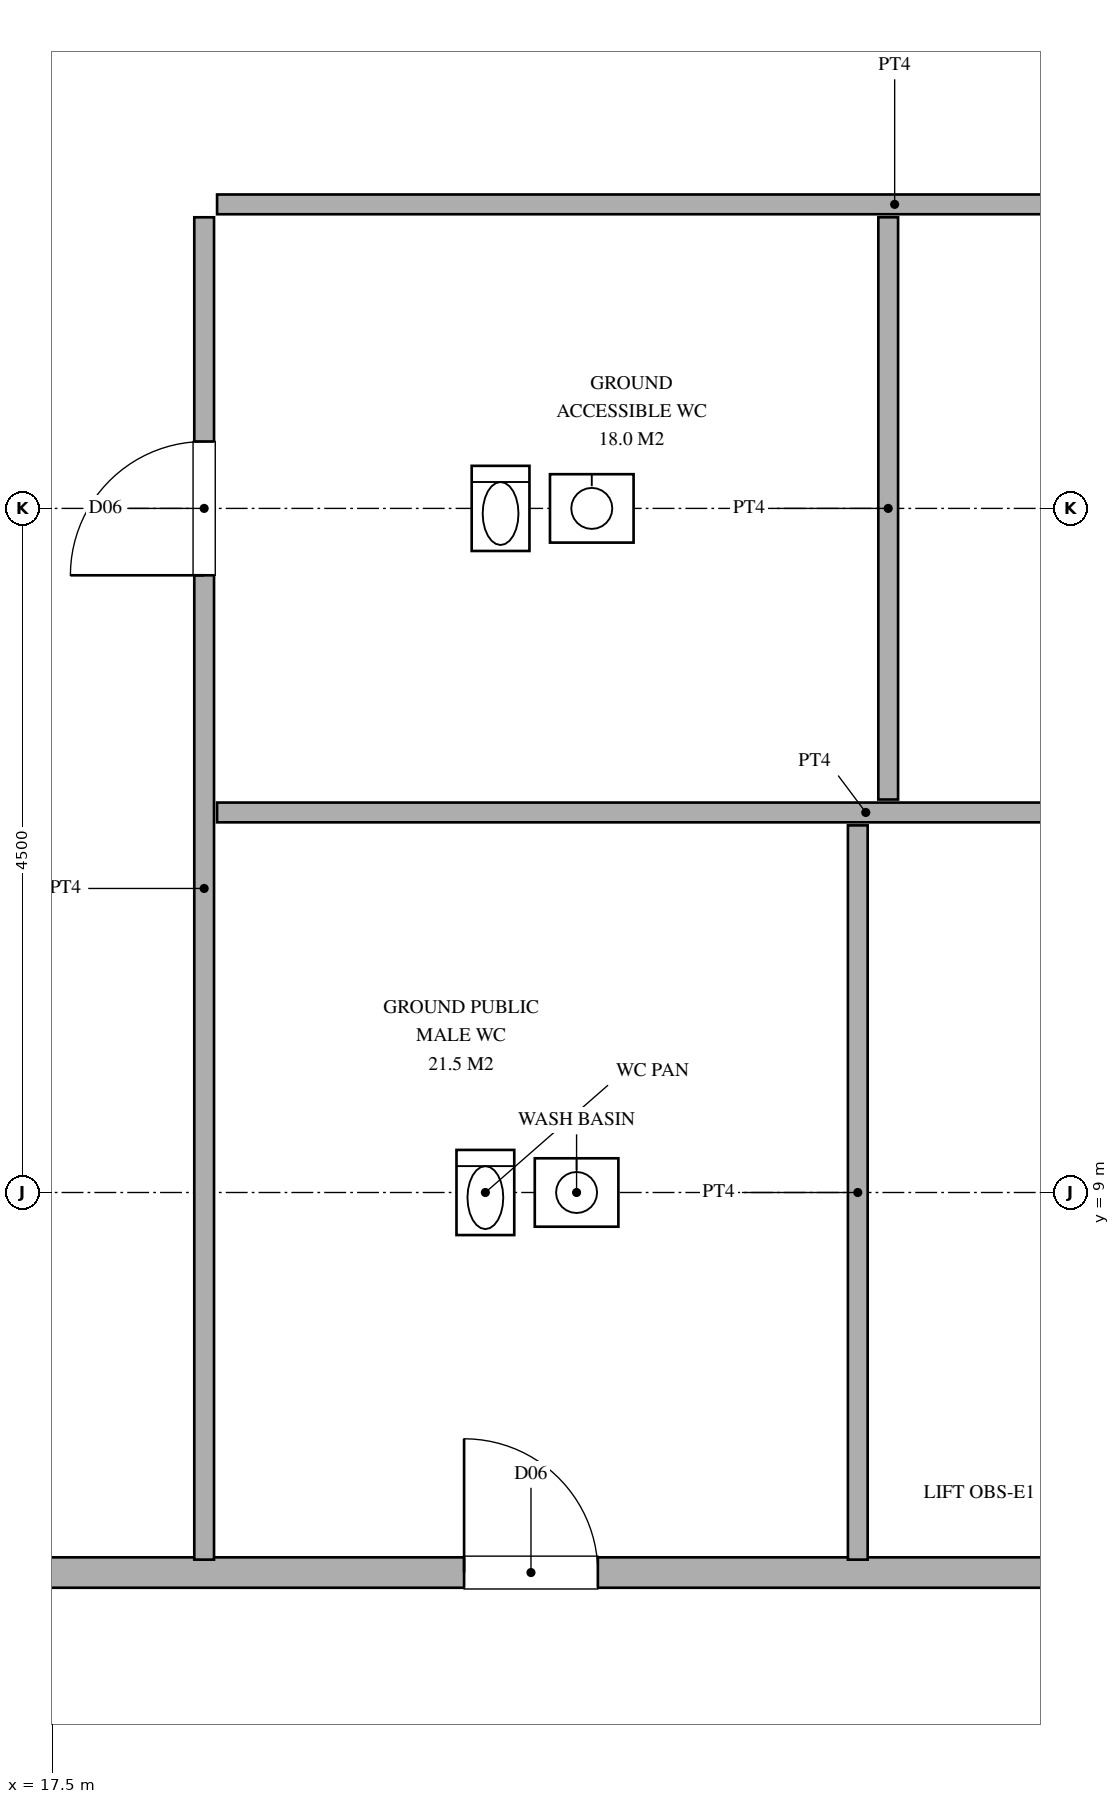
"""IFC4 building model, lengths in metres.
Left out: names, types, materials, properties, quantities, classifications, styles, units other than length and angle.
Written with IfcOpenShell. Run it as: python <this file> out.ifc"""

import sys

from ifc_helpers import new_model, si_unit, direction, frame, frame_2d, origin, place, context, subcontext, project, spatial, rectangle, extrude, source, transform, mapped, element, fill, save


model = new_model("IFC4")
c1 = context("Model", 3, precision=1e-05, world=origin(), true_north=direction((0.0, 1.0)))
c2 = subcontext(c1, "Body", "Model", "MODEL_VIEW")
j1 = project(units=[si_unit("LENGTHUNIT", "METRE"), si_unit("PLANEANGLEUNIT", "RADIAN")], contexts=[c1])
p1 = place(None, origin())
s1 = spatial("IfcSite", under=j1, at=p1, CompositionType="ELEMENT")
p2 = place(p1, origin())
s2 = spatial("IfcBuilding", under=s1, at=p2, CompositionType="ELEMENT")
p3 = place(p2, origin())
s3 = spatial("IfcBuildingStorey", under=s2, at=p3, CompositionType="ELEMENT", Elevation=0.0)
p4 = place(p3, frame((-27.12, 6.5, 0.0), z_axis=(0.0, 0.0, 1.0), x_axis=(1.0, 0.0, 0.0)))
e1 = element("IfcWall", 1, at=p4, inside=s3, PredefinedType="PARTITIONING", context=c2, shape_type="SweptSolid", body=[
    extrude(rectangle(XDim=54.24, YDim=0.2, at=frame_2d((27.12, 0.0))), origin(), (0.0, 0.0, 1.0), 5.12),
])
p5 = place(p4, frame((4.045, 0.0, 0.0)))
e2 = element("IfcOpeningElement", 2, at=p5, cuts=e1, PredefinedType="OPENING", context=c2, shape_type="SweptSolid", body=[
    extrude(rectangle(XDim=1.15, YDim=2.2, at=frame_2d((0.575, 1.1))), frame((0.0, 0.11, 0.0), z_axis=(0.0, -1.0, 0.0), x_axis=(1.0, 0.0, 0.0)), (0.0, 0.0, 1.0), 0.22),
])
p6 = place(p4, frame((17.395, 0.0, 0.0)))
e3 = element("IfcOpeningElement", 3, at=p6, cuts=e1, PredefinedType="OPENING", context=c2, shape_type="SweptSolid", body=[
    extrude(rectangle(XDim=0.95, YDim=2.15, at=frame_2d((0.475, 1.075))), frame((0.0, 0.11, 0.0), z_axis=(0.0, -1.0, 0.0), x_axis=(1.0, 0.0, 0.0)), (0.0, 0.0, 1.0), 0.22),
])
p7 = place(p4, frame((47.33, 0.0, 0.0)))
e4 = element("IfcOpeningElement", 4, at=p7, cuts=e1, PredefinedType="OPENING", context=c2, shape_type="SweptSolid", body=[
    extrude(rectangle(XDim=0.88, YDim=2.1, at=frame_2d((0.44, 1.05))), frame((0.0, 0.11, 0.0), z_axis=(0.0, -1.0, 0.0), x_axis=(1.0, 0.0, 0.0)), (0.0, 0.0, 1.0), 0.22),
])
p8 = place(p4, frame((51.68, 0.0, 0.0)))
e5 = element("IfcOpeningElement", 5, at=p8, cuts=e1, PredefinedType="OPENING", context=c2, shape_type="SweptSolid", body=[
    extrude(rectangle(XDim=0.88, YDim=2.1, at=frame_2d((0.44, 1.05))), frame((0.0, 0.11, 0.0), z_axis=(0.0, -1.0, 0.0), x_axis=(1.0, 0.0, 0.0)), (0.0, 0.0, 1.0), 0.22),
])
p9 = place(p3, frame((18.585, 11.5, 0.0), z_axis=(0.0, 0.0, 1.0), x_axis=(1.0, 0.0, 0.0)))
e6 = element("IfcWall", 6, at=p9, inside=s3, PredefinedType="PARTITIONING", context=c2, shape_type="SweptSolid", body=[
    extrude(rectangle(XDim=8.535, YDim=0.13, at=frame_2d((4.268, 0.0))), origin(), (0.0, 0.0, 1.0), 5.12),
])
p10 = place(p3, frame((18.585, 15.5, 0.0), z_axis=(0.0, 0.0, 1.0), x_axis=(1.0, 0.0, 0.0)))
e7 = element("IfcWall", 7, at=p10, inside=s3, PredefinedType="PARTITIONING", context=c2, shape_type="SweptSolid", body=[
    extrude(rectangle(XDim=8.915, YDim=0.13, at=frame_2d((4.458, 0.0))), origin(), (0.0, 0.0, 1.0), 5.12),
])
p11 = place(p3, frame((18.5, 6.585, 0.0), z_axis=(0.0, 0.0, 1.0), x_axis=(0.0, 1.0, 0.0)))
e8 = element("IfcWall", 8, at=p11, inside=s3, PredefinedType="PARTITIONING", context=c2, shape_type="SweptSolid", body=[
    extrude(rectangle(XDim=8.83, YDim=0.13, at=frame_2d((4.415, 0.0))), origin(), (0.0, 0.0, 1.0), 5.12),
])
p12 = place(p11, frame((6.475, 0.0, 0.0)))
e9 = element("IfcOpeningElement", 9, at=p12, cuts=e8, PredefinedType="OPENING", context=c2, shape_type="SweptSolid", body=[
    extrude(rectangle(XDim=0.88, YDim=2.1, at=frame_2d((0.44, 1.05))), frame((0.0, 0.075, 0.0), z_axis=(0.0, -1.0, 0.0), x_axis=(1.0, 0.0, 0.0)), (0.0, 0.0, 1.0), 0.15),
])
p13 = place(p3, frame((22.8, 6.585, 0.0), z_axis=(0.0, 0.0, 1.0), x_axis=(0.0, 1.0, 0.0)))
e10 = element("IfcWall", 10, at=p13, inside=s3, PredefinedType="PARTITIONING", context=c2, shape_type="SweptSolid", body=[
    extrude(rectangle(XDim=4.83, YDim=0.13, at=frame_2d((2.415, 0.0))), origin(), (0.0, 0.0, 1.0), 5.12),
])
p14 = place(p3, frame((23.0, 11.585, 0.0), z_axis=(0.0, 0.0, 1.0), x_axis=(0.0, 1.0, 0.0)))
e11 = element("IfcWall", 11, at=p14, inside=s3, PredefinedType="PARTITIONING", context=c2, shape_type="SweptSolid", body=[
    extrude(rectangle(XDim=3.83, YDim=0.13, at=frame_2d((1.915, 0.0))), origin(), (0.0, 0.0, 1.0), 5.12),
])
m1 = source(origin(), c2, "Body", "SweptSolid", [
    extrude(rectangle(XDim=0.88, YDim=2.1, at=frame_2d((0.44, 1.05))), frame((0.0, 0.025, 0.0), z_axis=(0.0, -1.0, 0.0), x_axis=(1.0, 0.0, 0.0)), (0.0, 0.0, 1.0), 0.05),
])
p15 = place(p7, origin())
e12 = element("IfcDoor", 12, at=p15, inside=s3, OperationType="SINGLE_SWING_LEFT", PredefinedType="DOOR", context=c2, shape_type="MappedRepresentation", body=[
    mapped(m1, transform((0.0, 0.0, 0.0), scale=1.0)),
])
fill(e4, e12)
p16 = place(p12, origin())
e13 = element("IfcDoor", 13, at=p16, inside=s3, OperationType="SINGLE_SWING_LEFT", PredefinedType="DOOR", context=c2, shape_type="MappedRepresentation", body=[
    mapped(m1, transform((0.0, 0.0, 0.0), scale=1.0)),
])
fill(e9, e13)
save(model, sys.argv[1])
